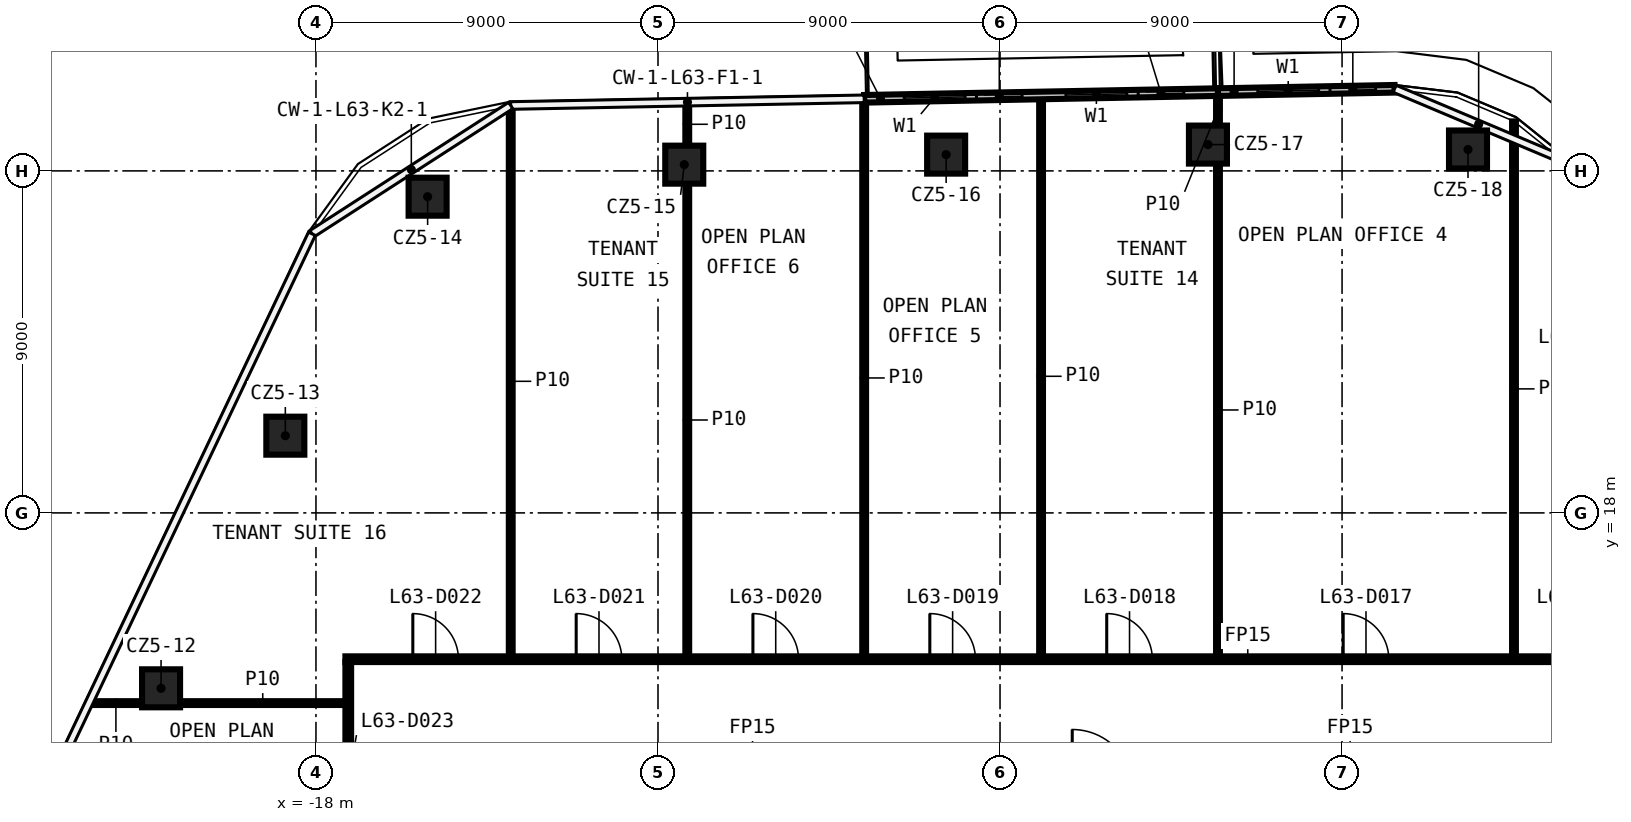
"""IFC4 building model, lengths in metres.
Left out: names, types, materials, properties, quantities, classifications, styles, units other than length and angle.
Written with IfcOpenShell. Run it as: python <this file> out.ifc"""

import sys

from ifc_helpers import new_model, si_unit, direction, frame, frame_2d, origin, origin_2d, place, context, subcontext, project, spatial, rectangle, extrude, element, fill, save


model = new_model("IFC4")
c1 = context("Model", 3, precision=1e-05, world=origin(), true_north=direction((0.0, 1.0)))
c2 = subcontext(c1, "Body", "Model", "MODEL_VIEW")
j1 = project(units=[si_unit("LENGTHUNIT", "METRE"), si_unit("PLANEANGLEUNIT", "RADIAN")], contexts=[c1])
p1 = place(None, origin())
s1 = spatial("IfcSite", under=j1, at=p1, CompositionType="ELEMENT")
p2 = place(p1, origin())
s2 = spatial("IfcBuilding", under=s1, at=p2, CompositionType="ELEMENT")
p3 = place(p2, frame((0.0, 0.0, 298.4)))
s3 = spatial("IfcBuildingStorey", under=s2, at=p3, CompositionType="ELEMENT", Elevation=298.4)
for number, where, z_axis, x_axis in (
    (1, (-22.076, 13.384, 0.0), (0.0, 0.0, 1.0), (1.0, 0.0, 0.0)),
    (2, (-18.806, 20.032, 0.0), (0.0, 0.0, 1.0), (1.0, 0.0, 0.0)),
    (3, (-15.062, 26.321, 0.0), (0.0, 0.0, 1.0), (1.0, 0.0, 0.0)),
    (4, (-8.309, 27.164, 0.0), (0.0, 0.0, 1.0), (1.0, 0.0, 0.0)),
    (5, (-1.418, 27.428, 0.0), (0.0, 0.0, 1.0), (1.0, 0.0, 0.0)),
    (6, (5.471, 27.692, 0.0), (0.0, 0.0, 1.0), (1.0, 0.0, 0.0)),
    (7, (12.314, 27.563, 0.0), (0.0, 0.0, 1.0), (1.0, 0.0, 0.0)),
):
    element("IfcColumn", number, at=place(p3, frame(where, z_axis=z_axis, x_axis=x_axis)), inside=s3, PredefinedType="COLUMN", context=c2, shape_type="SweptSolid", body=[
        extrude(rectangle(XDim=1.0, YDim=1.0, at=origin_2d()), origin(), (0.0, 0.0, 1.0), 3.82),
    ])
p4 = place(p3, frame((-23.952, 12.995, 0.0), z_axis=(0.0, 0.0, 1.0), x_axis=(1.0, 0.0, 0.0)))
e8 = element("IfcWall", 8, at=p4, inside=s3, PredefinedType="PARTITIONING", context=c2, shape_type="SweptSolid", body=[
    extrude(rectangle(XDim=1.376, YDim=0.1, at=frame_2d((0.688, 0.0))), origin(), (0.0, 0.0, 1.0), 3.82),
])
p5 = place(p3, frame((-21.576, 12.995, 0.0), z_axis=(0.0, 0.0, 1.0), x_axis=(1.0, 0.0, 0.0)))
e9 = element("IfcWall", 9, at=p5, inside=s3, PredefinedType="PARTITIONING", context=c2, shape_type="SweptSolid", body=[
    extrude(rectangle(XDim=4.351, YDim=0.1, at=frame_2d((2.175, 0.0))), origin(), (0.0, 0.0, 1.0), 3.82),
])
p6 = place(p3, frame((-17.225, 14.15, 0.0), z_axis=(0.0, 0.0, 1.0), x_axis=(1.0, 0.0, 0.0)))
e10 = element("IfcWall", 10, at=p6, inside=s3, PredefinedType="PARTITIONING", context=c2, shape_type="SweptSolid", body=[
    extrude(rectangle(XDim=34.45, YDim=0.15, at=frame_2d((17.225, 0.0))), origin(), (0.0, 0.0, 1.0), 3.82),
])
p7 = place(p6, frame((31.962, 0.0, 0.0)))
e11 = element("IfcOpeningElement", 11, at=p7, cuts=e10, PredefinedType="OPENING", context=c2, shape_type="SweptSolid", body=[
    extrude(rectangle(XDim=1.2, YDim=2.1, at=frame_2d((0.6, 1.05))), frame((0.0, 0.085, 0.0), z_axis=(0.0, -1.0, 0.0), x_axis=(1.0, 0.0, 0.0)), (0.0, 0.0, 1.0), 0.17),
])
p8 = place(p6, frame((26.254, 0.0, 0.0)))
e12 = element("IfcOpeningElement", 12, at=p8, cuts=e10, PredefinedType="OPENING", context=c2, shape_type="SweptSolid", body=[
    extrude(rectangle(XDim=1.2, YDim=2.1, at=frame_2d((0.6, 1.05))), frame((0.0, 0.085, 0.0), z_axis=(0.0, -1.0, 0.0), x_axis=(1.0, 0.0, 0.0)), (0.0, 0.0, 1.0), 0.17),
])
p9 = place(p6, frame((20.032, 0.0, 0.0)))
e13 = element("IfcOpeningElement", 13, at=p9, cuts=e10, PredefinedType="OPENING", context=c2, shape_type="SweptSolid", body=[
    extrude(rectangle(XDim=1.2, YDim=2.1, at=frame_2d((0.6, 1.05))), frame((0.0, 0.085, 0.0), z_axis=(0.0, -1.0, 0.0), x_axis=(1.0, 0.0, 0.0)), (0.0, 0.0, 1.0), 0.17),
])
p10 = place(p6, frame((15.378, 0.0, 0.0)))
e14 = element("IfcOpeningElement", 14, at=p10, cuts=e10, PredefinedType="OPENING", context=c2, shape_type="SweptSolid", body=[
    extrude(rectangle(XDim=1.2, YDim=2.1, at=frame_2d((0.6, 1.05))), frame((0.0, 0.085, 0.0), z_axis=(0.0, -1.0, 0.0), x_axis=(1.0, 0.0, 0.0)), (0.0, 0.0, 1.0), 0.17),
])
p11 = place(p6, frame((10.723, 0.0, 0.0)))
e15 = element("IfcOpeningElement", 15, at=p11, cuts=e10, PredefinedType="OPENING", context=c2, shape_type="SweptSolid", body=[
    extrude(rectangle(XDim=1.2, YDim=2.1, at=frame_2d((0.6, 1.05))), frame((0.0, 0.085, 0.0), z_axis=(0.0, -1.0, 0.0), x_axis=(1.0, 0.0, 0.0)), (0.0, 0.0, 1.0), 0.17),
])
p12 = place(p6, frame((6.073, 0.0, 0.0)))
e16 = element("IfcOpeningElement", 16, at=p12, cuts=e10, PredefinedType="OPENING", context=c2, shape_type="SweptSolid", body=[
    extrude(rectangle(XDim=1.2, YDim=2.1, at=frame_2d((0.6, 1.05))), frame((0.0, 0.085, 0.0), z_axis=(0.0, -1.0, 0.0), x_axis=(1.0, 0.0, 0.0)), (0.0, 0.0, 1.0), 0.17),
])
p13 = place(p6, frame((1.774, 0.0, 0.0)))
e17 = element("IfcOpeningElement", 17, at=p13, cuts=e10, PredefinedType="OPENING", context=c2, shape_type="SweptSolid", body=[
    extrude(rectangle(XDim=1.2, YDim=2.1, at=frame_2d((0.6, 1.05))), frame((0.0, 0.085, 0.0), z_axis=(0.0, -1.0, 0.0), x_axis=(1.0, 0.0, 0.0)), (0.0, 0.0, 1.0), 0.17),
])
p14 = place(p3, frame((13.524, 14.225, 0.0), z_axis=(0.0, 0.0, 1.0), x_axis=(0.0, 1.0, 0.0)))
e18 = element("IfcWall", 18, at=p14, inside=s3, PredefinedType="PARTITIONING", context=c2, shape_type="SweptSolid", body=[
    extrude(rectangle(XDim=14.077, YDim=0.1, at=frame_2d((7.039, 0.0))), origin(), (0.0, 0.0, 1.0), 3.82),
])
p15 = place(p3, frame((5.735, 14.225, 0.0), z_axis=(0.0, 0.0, 1.0), x_axis=(0.0, 1.0, 0.0)))
e19 = element("IfcWall", 19, at=p15, inside=s3, PredefinedType="PARTITIONING", context=c2, shape_type="SweptSolid", body=[
    extrude(rectangle(XDim=12.967, YDim=0.1, at=frame_2d((6.483, 0.0))), origin(), (0.0, 0.0, 1.0), 3.82),
])
p16 = place(p3, frame((5.735, 28.192, 0.0), z_axis=(0.0, 0.0, 1.0), x_axis=(0.0, 1.0, 0.0)))
e20 = element("IfcWall", 20, at=p16, inside=s3, PredefinedType="PARTITIONING", context=c2, shape_type="SweptSolid", body=[
    extrude(rectangle(XDim=0.861, YDim=0.1, at=frame_2d((0.43, 0.0))), origin(), (0.0, 0.0, 1.0), 3.82),
])
p17 = place(p3, frame((1.08, 14.225, 0.0), z_axis=(0.0, 0.0, 1.0), x_axis=(0.0, 1.0, 0.0)))
e21 = element("IfcWall", 21, at=p17, inside=s3, PredefinedType="PARTITIONING", context=c2, shape_type="SweptSolid", body=[
    extrude(rectangle(XDim=14.74, YDim=0.1, at=frame_2d((7.37, 0.0))), origin(), (0.0, 0.0, 1.0), 3.82),
])
p18 = place(p3, frame((-3.575, 14.225, 0.0), z_axis=(0.0, 0.0, 1.0), x_axis=(0.0, 1.0, 0.0)))
e22 = element("IfcWall", 22, at=p18, inside=s3, PredefinedType="PARTITIONING", context=c2, shape_type="SweptSolid", body=[
    extrude(rectangle(XDim=14.652, YDim=0.1, at=frame_2d((7.326, 0.0))), origin(), (0.0, 0.0, 1.0), 3.82),
])
p19 = place(p3, frame((-8.23, 14.225, 0.0), z_axis=(0.0, 0.0, 1.0), x_axis=(0.0, 1.0, 0.0)))
e23 = element("IfcWall", 23, at=p19, inside=s3, PredefinedType="PARTITIONING", context=c2, shape_type="SweptSolid", body=[
    extrude(rectangle(XDim=12.439, YDim=0.1, at=frame_2d((6.219, 0.0))), origin(), (0.0, 0.0, 1.0), 3.82),
])
p20 = place(p3, frame((-8.23, 27.664, 0.0), z_axis=(0.0, 0.0, 1.0), x_axis=(0.0, 1.0, 0.0)))
e24 = element("IfcWall", 24, at=p20, inside=s3, PredefinedType="PARTITIONING", context=c2, shape_type="SweptSolid", body=[
    extrude(rectangle(XDim=1.125, YDim=0.1, at=frame_2d((0.562, 0.0))), origin(), (0.0, 0.0, 1.0), 3.82),
])
p21 = place(p3, frame((-12.875, 14.225, 0.0), z_axis=(0.0, 0.0, 1.0), x_axis=(0.0, 1.0, 0.0)))
e25 = element("IfcWall", 25, at=p21, inside=s3, PredefinedType="PARTITIONING", context=c2, shape_type="SweptSolid", body=[
    extrude(rectangle(XDim=14.475, YDim=0.1, at=frame_2d((7.238, 0.0))), origin(), (0.0, 0.0, 1.0), 3.82),
])
p22 = place(p3, frame((-17.15, -14.075, 0.0), z_axis=(0.0, 0.0, 1.0), x_axis=(0.0, 1.0, 0.0)))
e26 = element("IfcWall", 26, at=p22, inside=s3, PredefinedType="PARTITIONING", context=c2, shape_type="SweptSolid", body=[
    extrude(rectangle(XDim=28.15, YDim=0.15, at=frame_2d((14.075, 0.0))), origin(), (0.0, 0.0, 1.0), 3.82),
])
p23 = place(p22, frame((11.151, 0.0, 0.0)))
e27 = element("IfcOpeningElement", 27, at=p23, cuts=e26, PredefinedType="OPENING", context=c2, shape_type="SweptSolid", body=[
    extrude(rectangle(XDim=1.2, YDim=2.1, at=frame_2d((0.6, 1.05))), frame((0.0, 0.085, 0.0), z_axis=(0.0, -1.0, 0.0), x_axis=(1.0, 0.0, 0.0)), (0.0, 0.0, 1.0), 0.17),
])
p24 = place(p22, frame((5.555, 0.0, 0.0)))
e28 = element("IfcOpeningElement", 28, at=p24, cuts=e26, PredefinedType="OPENING", context=c2, shape_type="SweptSolid", body=[
    extrude(rectangle(XDim=1.2, YDim=2.1, at=frame_2d((0.6, 1.05))), frame((0.0, 0.085, 0.0), z_axis=(0.0, -1.0, 0.0), x_axis=(1.0, 0.0, 0.0)), (0.0, 0.0, 1.0), 0.17),
])
p25 = place(p22, frame((1.7, 0.0, 0.0)))
e29 = element("IfcOpeningElement", 29, at=p25, cuts=e26, PredefinedType="OPENING", context=c2, shape_type="SweptSolid", body=[
    extrude(rectangle(XDim=1.2, YDim=2.1, at=frame_2d((0.6, 1.05))), frame((0.0, 0.085, 0.0), z_axis=(0.0, -1.0, 0.0), x_axis=(1.0, 0.0, 0.0)), (0.0, 0.0, 1.0), 0.17),
])
p26 = place(p22, frame((24.41, 0.0, 0.0)))
e30 = element("IfcOpeningElement", 30, at=p26, cuts=e26, PredefinedType="OPENING", context=c2, shape_type="SweptSolid", body=[
    extrude(rectangle(XDim=1.2, YDim=2.1, at=frame_2d((0.6, 1.05))), frame((0.0, 0.085, 0.0), z_axis=(0.0, -1.0, 0.0), x_axis=(1.0, 0.0, 0.0)), (0.0, 0.0, 1.0), 0.17),
])
p27 = place(p22, frame((20.29, 0.0, 0.0)))
e31 = element("IfcOpeningElement", 31, at=p27, cuts=e26, PredefinedType="OPENING", context=c2, shape_type="SweptSolid", body=[
    extrude(rectangle(XDim=1.2, YDim=2.1, at=frame_2d((0.6, 1.05))), frame((0.0, 0.085, 0.0), z_axis=(0.0, -1.0, 0.0), x_axis=(1.0, 0.0, 0.0)), (0.0, 0.0, 1.0), 0.17),
])
p28 = place(p22, frame((16.17, 0.0, 0.0)))
e32 = element("IfcOpeningElement", 32, at=p28, cuts=e26, PredefinedType="OPENING", context=c2, shape_type="SweptSolid", body=[
    extrude(rectangle(XDim=1.2, YDim=2.1, at=frame_2d((0.6, 1.05))), frame((0.0, 0.085, 0.0), z_axis=(0.0, -1.0, 0.0), x_axis=(1.0, 0.0, 0.0)), (0.0, 0.0, 1.0), 0.17),
])
p29 = place(p3, frame((5.735, 29.073, 0.0), z_axis=(0.0, 0.0, 1.0), x_axis=(-0.999821300983, -0.01890412918, 0.0)))
e33 = element("IfcWall", 33, at=p29, inside=s3, PredefinedType="SOLIDWALL", context=c2, shape_type="SweptSolid", body=[
    extrude(rectangle(XDim=9.312, YDim=0.2, at=frame_2d((4.656, 0.0))), origin(), (0.0, 0.0, 1.0), 3.82),
])
p30 = place(p29, frame((2.4, 0.0, 0.6)))
e34 = element("IfcOpeningElement", 34, at=p30, cuts=e33, PredefinedType="OPENING", context=c2, shape_type="SweptSolid", body=[
    extrude(rectangle(XDim=1.6, YDim=2.4, at=frame_2d((0.8, 1.2))), frame((0.0, 0.11, 0.0), z_axis=(0.0, -1.0, 0.0), x_axis=(1.0, 0.0, 0.0)), (0.0, 0.0, 1.0), 0.22),
])
p31 = place(p29, frame((0.9, 0.0, 0.0)))
e35 = element("IfcOpeningElement", 35, at=p31, cuts=e33, PredefinedType="OPENING", context=c2, shape_type="SweptSolid", body=[
    extrude(rectangle(XDim=1.2, YDim=2.4, at=frame_2d((0.6, 1.2))), frame((0.0, 0.11, 0.0), z_axis=(0.0, -1.0, 0.0), x_axis=(1.0, 0.0, 0.0)), (0.0, 0.0, 1.0), 0.22),
])
p32 = place(p29, frame((6.656, 0.0, 0.6)))
e36 = element("IfcOpeningElement", 36, at=p32, cuts=e33, PredefinedType="OPENING", context=c2, shape_type="SweptSolid", body=[
    extrude(rectangle(XDim=1.6, YDim=2.4, at=frame_2d((0.8, 1.2))), frame((0.0, 0.11, 0.0), z_axis=(0.0, -1.0, 0.0), x_axis=(1.0, 0.0, 0.0)), (0.0, 0.0, 1.0), 0.22),
])
p33 = place(p29, frame((5.156, 0.0, 0.0)))
e37 = element("IfcOpeningElement", 37, at=p33, cuts=e33, PredefinedType="OPENING", context=c2, shape_type="SweptSolid", body=[
    extrude(rectangle(XDim=1.2, YDim=2.4, at=frame_2d((0.6, 1.2))), frame((0.0, 0.11, 0.0), z_axis=(0.0, -1.0, 0.0), x_axis=(1.0, 0.0, 0.0)), (0.0, 0.0, 1.0), 0.22),
])
p34 = place(p3, frame((10.383, 29.161, 0.0), z_axis=(0.0, 0.0, 1.0), x_axis=(-0.999821262404, -0.018906169475, 0.0)))
e38 = element("IfcWall", 38, at=p34, inside=s3, PredefinedType="SOLIDWALL", context=c2, shape_type="SweptSolid", body=[
    extrude(rectangle(XDim=4.649, YDim=0.2, at=frame_2d((2.324, 0.0))), origin(), (0.0, 0.0, 1.0), 3.82),
])
p35 = place(p34, frame((2.0, 0.0, 0.6)))
e39 = element("IfcOpeningElement", 39, at=p35, cuts=e38, PredefinedType="OPENING", context=c2, shape_type="SweptSolid", body=[
    extrude(rectangle(XDim=1.6, YDim=2.4, at=frame_2d((0.8, 1.2))), frame((0.0, 0.11, 0.0), z_axis=(0.0, -1.0, 0.0), x_axis=(1.0, 0.0, 0.0)), (0.0, 0.0, 1.0), 0.22),
])
p36 = place(p34, frame((0.5, 0.0, 0.0)))
e40 = element("IfcOpeningElement", 40, at=p36, cuts=e38, PredefinedType="OPENING", context=c2, shape_type="SweptSolid", body=[
    extrude(rectangle(XDim=1.2, YDim=2.4, at=frame_2d((0.6, 1.2))), frame((0.0, 0.11, 0.0), z_axis=(0.0, -1.0, 0.0), x_axis=(1.0, 0.0, 0.0)), (0.0, 0.0, 1.0), 0.22),
])
p37 = place(p8, origin())
e41 = element("IfcDoor", 41, at=p37, inside=s3, OperationType="SINGLE_SWING_RIGHT", PredefinedType="DOOR", context=c2, shape_type="SweptSolid", body=[
    extrude(rectangle(XDim=1.2, YDim=2.1, at=frame_2d((0.6, 1.05))), frame((0.0, 0.025, 0.0), z_axis=(0.0, -1.0, 0.0), x_axis=(1.0, 0.0, 0.0)), (0.0, 0.0, 1.0), 0.05),
])
fill(e12, e41)
p38 = place(p9, origin())
e42 = element("IfcDoor", 42, at=p38, inside=s3, OperationType="SINGLE_SWING_LEFT", PredefinedType="DOOR", context=c2, shape_type="SweptSolid", body=[
    extrude(rectangle(XDim=1.2, YDim=2.1, at=frame_2d((0.6, 1.05))), frame((0.0, 0.025, 0.0), z_axis=(0.0, -1.0, 0.0), x_axis=(1.0, 0.0, 0.0)), (0.0, 0.0, 1.0), 0.05),
])
fill(e13, e42)
p39 = place(p10, origin())
e43 = element("IfcDoor", 43, at=p39, inside=s3, OperationType="SINGLE_SWING_RIGHT", PredefinedType="DOOR", context=c2, shape_type="SweptSolid", body=[
    extrude(rectangle(XDim=1.2, YDim=2.1, at=frame_2d((0.6, 1.05))), frame((0.0, 0.025, 0.0), z_axis=(0.0, -1.0, 0.0), x_axis=(1.0, 0.0, 0.0)), (0.0, 0.0, 1.0), 0.05),
])
fill(e14, e43)
p40 = place(p11, origin())
e44 = element("IfcDoor", 44, at=p40, inside=s3, OperationType="SINGLE_SWING_LEFT", PredefinedType="DOOR", context=c2, shape_type="SweptSolid", body=[
    extrude(rectangle(XDim=1.2, YDim=2.1, at=frame_2d((0.6, 1.05))), frame((0.0, 0.025, 0.0), z_axis=(0.0, -1.0, 0.0), x_axis=(1.0, 0.0, 0.0)), (0.0, 0.0, 1.0), 0.05),
])
fill(e15, e44)
p41 = place(p12, origin())
e45 = element("IfcDoor", 45, at=p41, inside=s3, OperationType="SINGLE_SWING_RIGHT", PredefinedType="DOOR", context=c2, shape_type="SweptSolid", body=[
    extrude(rectangle(XDim=1.2, YDim=2.1, at=frame_2d((0.6, 1.05))), frame((0.0, 0.025, 0.0), z_axis=(0.0, -1.0, 0.0), x_axis=(1.0, 0.0, 0.0)), (0.0, 0.0, 1.0), 0.05),
])
fill(e16, e45)
p42 = place(p13, origin())
e46 = element("IfcDoor", 46, at=p42, inside=s3, OperationType="SINGLE_SWING_LEFT", PredefinedType="DOOR", context=c2, shape_type="SweptSolid", body=[
    extrude(rectangle(XDim=1.2, YDim=2.1, at=frame_2d((0.6, 1.05))), frame((0.0, 0.025, 0.0), z_axis=(0.0, -1.0, 0.0), x_axis=(1.0, 0.0, 0.0)), (0.0, 0.0, 1.0), 0.05),
])
fill(e17, e46)
p43 = place(p30, origin())
e47 = element("IfcWindow", 47, at=p43, inside=s3, PartitioningType="SINGLE_PANEL", PredefinedType="WINDOW", context=c2, shape_type="SweptSolid", body=[
    extrude(rectangle(XDim=1.6, YDim=2.4, at=frame_2d((0.8, 1.2))), frame((0.0, 0.03, 0.0), z_axis=(0.0, -1.0, 0.0), x_axis=(1.0, 0.0, 0.0)), (0.0, 0.0, 1.0), 0.06),
])
fill(e34, e47)
p44 = place(p31, origin())
e48 = element("IfcDoor", 48, at=p44, inside=s3, OperationType="SLIDING_TO_LEFT", PredefinedType="DOOR", context=c2, shape_type="SweptSolid", body=[
    extrude(rectangle(XDim=1.2, YDim=2.4, at=frame_2d((0.6, 1.2))), frame((0.0, 0.025, 0.0), z_axis=(0.0, -1.0, 0.0), x_axis=(1.0, 0.0, 0.0)), (0.0, 0.0, 1.0), 0.05),
])
fill(e35, e48)
p45 = place(p32, origin())
e49 = element("IfcWindow", 49, at=p45, inside=s3, PartitioningType="SINGLE_PANEL", PredefinedType="WINDOW", context=c2, shape_type="SweptSolid", body=[
    extrude(rectangle(XDim=1.6, YDim=2.4, at=frame_2d((0.8, 1.2))), frame((0.0, 0.03, 0.0), z_axis=(0.0, -1.0, 0.0), x_axis=(1.0, 0.0, 0.0)), (0.0, 0.0, 1.0), 0.06),
])
fill(e36, e49)
p46 = place(p33, origin())
e50 = element("IfcDoor", 50, at=p46, inside=s3, OperationType="SLIDING_TO_LEFT", PredefinedType="DOOR", context=c2, shape_type="SweptSolid", body=[
    extrude(rectangle(XDim=1.2, YDim=2.4, at=frame_2d((0.6, 1.2))), frame((0.0, 0.025, 0.0), z_axis=(0.0, -1.0, 0.0), x_axis=(1.0, 0.0, 0.0)), (0.0, 0.0, 1.0), 0.05),
])
fill(e37, e50)
p47 = place(p35, origin())
e51 = element("IfcWindow", 51, at=p47, inside=s3, PartitioningType="SINGLE_PANEL", PredefinedType="WINDOW", context=c2, shape_type="SweptSolid", body=[
    extrude(rectangle(XDim=1.6, YDim=2.4, at=frame_2d((0.8, 1.2))), frame((0.0, 0.03, 0.0), z_axis=(0.0, -1.0, 0.0), x_axis=(1.0, 0.0, 0.0)), (0.0, 0.0, 1.0), 0.06),
])
fill(e39, e51)
p48 = place(p36, origin())
e52 = element("IfcDoor", 52, at=p48, inside=s3, OperationType="SLIDING_TO_LEFT", PredefinedType="DOOR", context=c2, shape_type="SweptSolid", body=[
    extrude(rectangle(XDim=1.2, YDim=2.4, at=frame_2d((0.6, 1.2))), frame((0.0, 0.025, 0.0), z_axis=(0.0, -1.0, 0.0), x_axis=(1.0, 0.0, 0.0)), (0.0, 0.0, 1.0), 0.05),
])
fill(e40, e52)
save(model, sys.argv[1])
